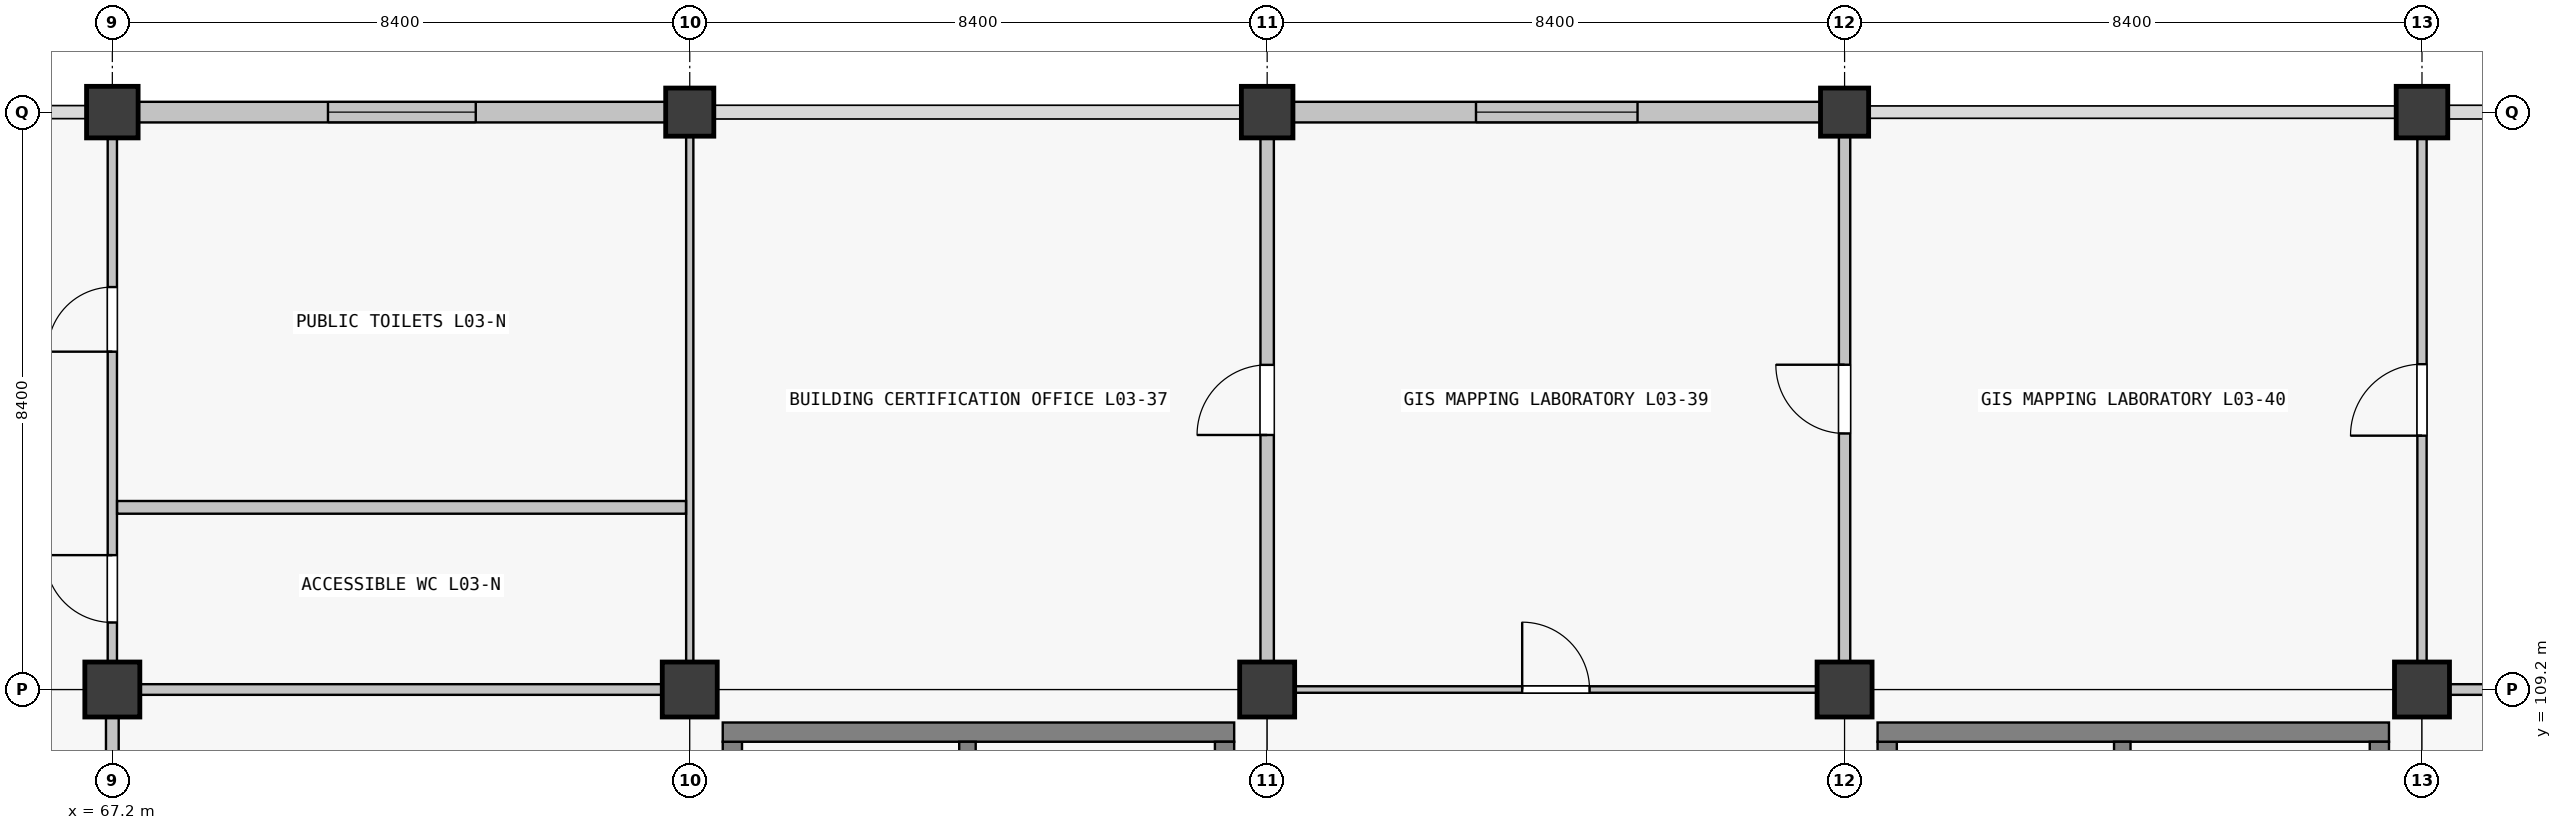
"""IFC4 building model, lengths in metres.
Left out: names, types, materials, properties, quantities, classifications, styles, units other than length and angle.
Written with IfcOpenShell. Run it as: python <this file> out.ifc"""

import sys

from ifc_helpers import new_model, si_unit, direction, frame, frame_2d, origin, origin_2d, place, context, subcontext, project, spatial, rectangle, extrude, element, fill, save


model = new_model("IFC4")
c1 = context("Model", 3, precision=1e-05, world=origin(), true_north=direction((0.0, 1.0)))
c2 = subcontext(c1, "Body", "Model", "MODEL_VIEW")
j1 = project(units=[si_unit("LENGTHUNIT", "METRE"), si_unit("PLANEANGLEUNIT", "RADIAN")], contexts=[c1])
p1 = place(None, origin())
s1 = spatial("IfcSite", under=j1, at=p1, CompositionType="ELEMENT")
p2 = place(p1, origin())
s2 = spatial("IfcBuilding", under=s1, at=p2, CompositionType="ELEMENT")
p3 = place(p2, frame((0.0, 0.0, 14.76)))
s3 = spatial("IfcBuildingStorey", under=s2, at=p3, CompositionType="ELEMENT", Elevation=14.76)
p4 = place(p3, frame((67.2, 109.2, 0.0), z_axis=(0.0, 0.0, 1.0), x_axis=(1.0, 0.0, 0.0)))
e1 = element("IfcColumn", 1, at=p4, inside=s3, PredefinedType="COLUMN", context=c2, shape_type="SweptSolid", body=[
    extrude(rectangle(XDim=0.8, YDim=0.8, at=origin_2d()), origin(), (0.0, 0.0, 1.0), 4.32),
])
p5 = place(p3, frame((67.2, 117.6, 0.0), z_axis=(0.0, 0.0, 1.0), x_axis=(1.0, 0.0, 0.0)))
e2 = element("IfcColumn", 2, at=p5, inside=s3, PredefinedType="COLUMN", context=c2, shape_type="SweptSolid", body=[
    extrude(rectangle(XDim=0.75, YDim=0.75, at=origin_2d()), origin(), (0.0, 0.0, 1.0), 4.32),
])
p6 = place(p3, frame((75.6, 109.2, 0.0), z_axis=(0.0, 0.0, 1.0), x_axis=(1.0, 0.0, 0.0)))
e3 = element("IfcColumn", 3, at=p6, inside=s3, PredefinedType="COLUMN", context=c2, shape_type="SweptSolid", body=[
    extrude(rectangle(XDim=0.8, YDim=0.8, at=origin_2d()), origin(), (0.0, 0.0, 1.0), 4.32),
])
p7 = place(p3, frame((75.6, 117.6, 0.0), z_axis=(0.0, 0.0, 1.0), x_axis=(1.0, 0.0, 0.0)))
e4 = element("IfcColumn", 4, at=p7, inside=s3, PredefinedType="COLUMN", context=c2, shape_type="SweptSolid", body=[
    extrude(rectangle(XDim=0.7, YDim=0.7, at=origin_2d()), origin(), (0.0, 0.0, 1.0), 4.32),
])
p8 = place(p3, frame((84.0, 109.2, 0.0), z_axis=(0.0, 0.0, 1.0), x_axis=(1.0, 0.0, 0.0)))
e5 = element("IfcColumn", 5, at=p8, inside=s3, PredefinedType="COLUMN", context=c2, shape_type="SweptSolid", body=[
    extrude(rectangle(XDim=0.8, YDim=0.8, at=origin_2d()), origin(), (0.0, 0.0, 1.0), 4.32),
])
p9 = place(p3, frame((84.0, 117.6, 0.0), z_axis=(0.0, 0.0, 1.0), x_axis=(1.0, 0.0, 0.0)))
e6 = element("IfcColumn", 6, at=p9, inside=s3, PredefinedType="COLUMN", context=c2, shape_type="SweptSolid", body=[
    extrude(rectangle(XDim=0.75, YDim=0.75, at=origin_2d()), origin(), (0.0, 0.0, 1.0), 4.32),
])
p10 = place(p3, frame((92.4, 109.2, 0.0), z_axis=(0.0, 0.0, 1.0), x_axis=(1.0, 0.0, 0.0)))
e7 = element("IfcColumn", 7, at=p10, inside=s3, PredefinedType="COLUMN", context=c2, shape_type="SweptSolid", body=[
    extrude(rectangle(XDim=0.8, YDim=0.8, at=origin_2d()), origin(), (0.0, 0.0, 1.0), 4.32),
])
p11 = place(p3, frame((92.4, 117.6, 0.0), z_axis=(0.0, 0.0, 1.0), x_axis=(1.0, 0.0, 0.0)))
e8 = element("IfcColumn", 8, at=p11, inside=s3, PredefinedType="COLUMN", context=c2, shape_type="SweptSolid", body=[
    extrude(rectangle(XDim=0.7, YDim=0.7, at=origin_2d()), origin(), (0.0, 0.0, 1.0), 4.32),
])
p12 = place(p3, frame((100.8, 109.2, 0.0), z_axis=(0.0, 0.0, 1.0), x_axis=(1.0, 0.0, 0.0)))
e9 = element("IfcColumn", 9, at=p12, inside=s3, PredefinedType="COLUMN", context=c2, shape_type="SweptSolid", body=[
    extrude(rectangle(XDim=0.8, YDim=0.8, at=origin_2d()), origin(), (0.0, 0.0, 1.0), 4.32),
])
p13 = place(p3, frame((100.8, 117.6, 0.0), z_axis=(0.0, 0.0, 1.0), x_axis=(1.0, 0.0, 0.0)))
e10 = element("IfcColumn", 10, at=p13, inside=s3, PredefinedType="COLUMN", context=c2, shape_type="SweptSolid", body=[
    extrude(rectangle(XDim=0.75, YDim=0.75, at=origin_2d()), origin(), (0.0, 0.0, 1.0), 4.32),
])
p14 = place(p3, frame((67.576, 117.6, 0.0), z_axis=(0.0, 0.0, 1.0), x_axis=(1.0, 0.0, 0.0)))
e11 = element("IfcWall", 11, at=p14, inside=s3, PredefinedType="SOLIDWALL", context=c2, shape_type="SweptSolid", body=[
    extrude(rectangle(XDim=7.673, YDim=0.3, at=frame_2d((3.836, 0.0))), origin(), (0.0, 0.0, 1.0), 3.37),
])
p15 = place(p14, frame((2.761, 0.0, 0.9)))
e12 = element("IfcOpeningElement", 12, at=p15, cuts=e11, PredefinedType="OPENING", context=c2, shape_type="SweptSolid", body=[
    extrude(rectangle(XDim=2.15, YDim=1.95, at=frame_2d((1.075, 0.975))), frame((0.0, 0.15, 0.0), z_axis=(0.0, -1.0, 0.0), x_axis=(1.0, 0.0, 0.0)), (0.0, 0.0, 1.0), 0.3),
])
p16 = place(p3, frame((84.376, 117.6, 0.0), z_axis=(0.0, 0.0, 1.0), x_axis=(1.0, 0.0, 0.0)))
e13 = element("IfcWall", 13, at=p16, inside=s3, PredefinedType="SOLIDWALL", context=c2, shape_type="SweptSolid", body=[
    extrude(rectangle(XDim=7.673, YDim=0.3, at=frame_2d((3.836, 0.0))), origin(), (0.0, 0.0, 1.0), 3.37),
])
p17 = place(p16, frame((2.662, 0.0, 0.9)))
e14 = element("IfcOpeningElement", 14, at=p17, cuts=e13, PredefinedType="OPENING", context=c2, shape_type="SweptSolid", body=[
    extrude(rectangle(XDim=2.35, YDim=1.6, at=frame_2d((1.175, 0.8))), frame((0.0, 0.15, 0.0), z_axis=(0.0, -1.0, 0.0), x_axis=(1.0, 0.0, 0.0)), (0.0, 0.0, 1.0), 0.3),
])
p18 = place(p3, frame((76.22, 101.56, 0.0), z_axis=(0.0, 0.0, 1.0), x_axis=(0.0, 1.0, 0.0)))
e15 = element("IfcWall", 15, at=p18, inside=s3, PredefinedType="SHEAR", context=c2, shape_type="SweptSolid", body=[
    extrude(rectangle(XDim=6.88, YDim=0.28, at=frame_2d((3.44, 0.0))), origin(), (0.0, 0.0, 1.0), 4.32),
])
p19 = place(p3, frame((76.08, 108.58, 0.0), z_axis=(0.0, 0.0, 1.0), x_axis=(1.0, 0.0, 0.0)))
e16 = element("IfcWall", 16, at=p19, inside=s3, PredefinedType="SHEAR", context=c2, shape_type="SweptSolid", body=[
    extrude(rectangle(XDim=7.44, YDim=0.28, at=frame_2d((3.72, 0.0))), origin(), (0.0, 0.0, 1.0), 4.32),
])
p20 = place(p3, frame((83.38, 108.44, 0.0), z_axis=(0.0, 0.0, 1.0), x_axis=(0.0, -1.0, 0.0)))
e17 = element("IfcWall", 17, at=p20, inside=s3, PredefinedType="SHEAR", context=c2, shape_type="SweptSolid", body=[
    extrude(rectangle(XDim=6.88, YDim=0.28, at=frame_2d((3.44, 0.0))), origin(), (0.0, 0.0, 1.0), 4.32),
])
p21 = place(p20, frame((3.99, 0.0, 0.0)))
e18 = element("IfcOpeningElement", 18, at=p21, cuts=e17, PredefinedType="OPENING", context=c2, shape_type="SweptSolid", body=[
    extrude(rectangle(XDim=1.5, YDim=2.15, at=frame_2d((0.75, 1.075))), frame((0.0, 0.14, 0.0), z_axis=(0.0, -1.0, 0.0), x_axis=(1.0, 0.0, 0.0)), (0.0, 0.0, 1.0), 0.28),
])
p22 = place(p3, frame((79.64, 101.56, 0.0), z_axis=(0.0, 0.0, 1.0), x_axis=(0.0, 1.0, 0.0)))
e19 = element("IfcWall", 19, at=p22, inside=s3, PredefinedType="SHEAR", context=c2, shape_type="SweptSolid", body=[
    extrude(rectangle(XDim=6.88, YDim=0.24, at=frame_2d((3.44, 0.0))), origin(), (0.0, 0.0, 1.0), 4.32),
])
p23 = place(p22, frame((0.12, 0.0, 0.0)))
e20 = element("IfcOpeningElement", 20, at=p23, cuts=e19, PredefinedType="OPENING", context=c2, shape_type="SweptSolid", body=[
    extrude(rectangle(XDim=1.0, YDim=2.15, at=frame_2d((0.5, 1.075))), frame((0.0, 0.12, 0.0), z_axis=(0.0, -1.0, 0.0), x_axis=(1.0, 0.0, 0.0)), (0.0, 0.0, 1.0), 0.24),
])
p24 = place(p3, frame((93.02, 101.56, 0.0), z_axis=(0.0, 0.0, 1.0), x_axis=(0.0, 1.0, 0.0)))
e21 = element("IfcWall", 21, at=p24, inside=s3, PredefinedType="SHEAR", context=c2, shape_type="SweptSolid", body=[
    extrude(rectangle(XDim=6.88, YDim=0.28, at=frame_2d((3.44, 0.0))), origin(), (0.0, 0.0, 1.0), 4.32),
])
p25 = place(p3, frame((92.88, 108.58, 0.0), z_axis=(0.0, 0.0, 1.0), x_axis=(1.0, 0.0, 0.0)))
e22 = element("IfcWall", 22, at=p25, inside=s3, PredefinedType="SHEAR", context=c2, shape_type="SweptSolid", body=[
    extrude(rectangle(XDim=7.44, YDim=0.28, at=frame_2d((3.72, 0.0))), origin(), (0.0, 0.0, 1.0), 4.32),
])
p26 = place(p3, frame((100.18, 108.44, 0.0), z_axis=(0.0, 0.0, 1.0), x_axis=(0.0, -1.0, 0.0)))
e23 = element("IfcWall", 23, at=p26, inside=s3, PredefinedType="SHEAR", context=c2, shape_type="SweptSolid", body=[
    extrude(rectangle(XDim=6.88, YDim=0.28, at=frame_2d((3.44, 0.0))), origin(), (0.0, 0.0, 1.0), 4.32),
])
p27 = place(p26, frame((3.99, 0.0, 0.0)))
e24 = element("IfcOpeningElement", 24, at=p27, cuts=e23, PredefinedType="OPENING", context=c2, shape_type="SweptSolid", body=[
    extrude(rectangle(XDim=1.5, YDim=2.15, at=frame_2d((0.75, 1.075))), frame((0.0, 0.14, 0.0), z_axis=(0.0, -1.0, 0.0), x_axis=(1.0, 0.0, 0.0)), (0.0, 0.0, 1.0), 0.28),
])
p28 = place(p3, frame((96.44, 101.56, 0.0), z_axis=(0.0, 0.0, 1.0), x_axis=(0.0, 1.0, 0.0)))
e25 = element("IfcWall", 25, at=p28, inside=s3, PredefinedType="SHEAR", context=c2, shape_type="SweptSolid", body=[
    extrude(rectangle(XDim=6.88, YDim=0.24, at=frame_2d((3.44, 0.0))), origin(), (0.0, 0.0, 1.0), 4.32),
])
p29 = place(p28, frame((0.12, 0.0, 0.0)))
e26 = element("IfcOpeningElement", 26, at=p29, cuts=e25, PredefinedType="OPENING", context=c2, shape_type="SweptSolid", body=[
    extrude(rectangle(XDim=1.0, YDim=2.15, at=frame_2d((0.5, 1.075))), frame((0.0, 0.12, 0.0), z_axis=(0.0, -1.0, 0.0), x_axis=(1.0, 0.0, 0.0)), (0.0, 0.0, 1.0), 0.24),
])
p30 = place(p3, frame((67.602, 109.2, 0.0), z_axis=(0.0, 0.0, 1.0), x_axis=(1.0, 0.0, 0.0)))
e27 = element("IfcWall", 27, at=p30, inside=s3, PredefinedType="PARTITIONING", context=c2, shape_type="SweptSolid", body=[
    extrude(rectangle(XDim=7.596, YDim=0.155, at=frame_2d((3.798, 0.0))), origin(), (0.0, 0.0, 1.0), 3.19),
])
p31 = place(p3, frame((84.402, 109.2, 0.0), z_axis=(0.0, 0.0, 1.0), x_axis=(1.0, 0.0, 0.0)))
e28 = element("IfcWall", 28, at=p31, inside=s3, PredefinedType="PARTITIONING", context=c2, shape_type="SweptSolid", body=[
    extrude(rectangle(XDim=7.596, YDim=0.095, at=frame_2d((3.798, 0.0))), origin(), (0.0, 0.0, 1.0), 3.19),
])
p32 = place(p31, frame((3.308, 0.0, 0.0)))
e29 = element("IfcOpeningElement", 29, at=p32, cuts=e28, PredefinedType="OPENING", context=c2, shape_type="SweptSolid", body=[
    extrude(rectangle(XDim=0.98, YDim=2.18, at=frame_2d((0.49, 1.09))), frame((0.0, 0.047, 0.0), z_axis=(0.0, -1.0, 0.0), x_axis=(1.0, 0.0, 0.0)), (0.0, 0.0, 1.0), 0.095),
])
p33 = place(p3, frame((101.202, 109.2, 0.0), z_axis=(0.0, 0.0, 1.0), x_axis=(1.0, 0.0, 0.0)))
e30 = element("IfcWall", 30, at=p33, inside=s3, PredefinedType="PARTITIONING", context=c2, shape_type="SweptSolid", body=[
    extrude(rectangle(XDim=7.596, YDim=0.155, at=frame_2d((3.798, 0.0))), origin(), (0.0, 0.0, 1.0), 3.19),
])
p34 = place(p33, frame((3.273, 0.0, 0.0)))
e31 = element("IfcOpeningElement", 31, at=p34, cuts=e30, PredefinedType="OPENING", context=c2, shape_type="SweptSolid", body=[
    extrude(rectangle(XDim=1.05, YDim=2.12, at=frame_2d((0.525, 1.06))), frame((0.0, 0.078, 0.0), z_axis=(0.0, -1.0, 0.0), x_axis=(1.0, 0.0, 0.0)), (0.0, 0.0, 1.0), 0.155),
])
p35 = place(p3, frame((67.2, 101.202, 0.0), z_axis=(0.0, 0.0, 1.0), x_axis=(0.0, 1.0, 0.0)))
e32 = element("IfcWall", 32, at=p35, inside=s3, PredefinedType="PARTITIONING", context=c2, shape_type="SweptSolid", body=[
    extrude(rectangle(XDim=7.596, YDim=0.185, at=frame_2d((3.798, 0.0))), origin(), (0.0, 0.0, 1.0), 3.19),
])
p36 = place(p35, frame((3.318, 0.0, 0.0)))
e33 = element("IfcOpeningElement", 33, at=p36, cuts=e32, PredefinedType="OPENING", context=c2, shape_type="SweptSolid", body=[
    extrude(rectangle(XDim=0.96, YDim=2.18, at=frame_2d((0.48, 1.09))), frame((0.0, 0.093, 0.0), z_axis=(0.0, -1.0, 0.0), x_axis=(1.0, 0.0, 0.0)), (0.0, 0.0, 1.0), 0.185),
])
p37 = place(p3, frame((67.2, 109.602, 0.0), z_axis=(0.0, 0.0, 1.0), x_axis=(0.0, 1.0, 0.0)))
e34 = element("IfcWall", 34, at=p37, inside=s3, PredefinedType="PARTITIONING", context=c2, shape_type="SweptSolid", body=[
    extrude(rectangle(XDim=7.621, YDim=0.135, at=frame_2d((3.811, 0.0))), origin(), (0.0, 0.0, 1.0), 3.19),
])
p38 = place(p37, frame((0.573, 0.0, 0.0)))
e35 = element("IfcOpeningElement", 35, at=p38, cuts=e34, PredefinedType="OPENING", context=c2, shape_type="SweptSolid", body=[
    extrude(rectangle(XDim=0.98, YDim=2.08, at=frame_2d((0.49, 1.04))), frame((0.0, 0.067, 0.0), z_axis=(0.0, -1.0, 0.0), x_axis=(1.0, 0.0, 0.0)), (0.0, 0.0, 1.0), 0.135),
])
p39 = place(p37, frame((4.513, 0.0, 0.0)))
e36 = element("IfcOpeningElement", 36, at=p39, cuts=e34, PredefinedType="OPENING", context=c2, shape_type="SweptSolid", body=[
    extrude(rectangle(XDim=0.94, YDim=2.08, at=frame_2d((0.47, 1.04))), frame((0.0, 0.067, 0.0), z_axis=(0.0, -1.0, 0.0), x_axis=(1.0, 0.0, 0.0)), (0.0, 0.0, 1.0), 0.135),
])
p40 = place(p3, frame((75.6, 109.602, 0.0), z_axis=(0.0, 0.0, 1.0), x_axis=(0.0, 1.0, 0.0)))
e37 = element("IfcWall", 37, at=p40, inside=s3, PredefinedType="PARTITIONING", context=c2, shape_type="SweptSolid", body=[
    extrude(rectangle(XDim=7.646, YDim=0.105, at=frame_2d((3.823, 0.0))), origin(), (0.0, 0.0, 1.0), 3.19),
])
p41 = place(p3, frame((84.0, 109.602, 0.0), z_axis=(0.0, 0.0, 1.0), x_axis=(0.0, 1.0, 0.0)))
e38 = element("IfcWall", 38, at=p41, inside=s3, PredefinedType="PARTITIONING", context=c2, shape_type="SweptSolid", body=[
    extrude(rectangle(XDim=7.621, YDim=0.195, at=frame_2d((3.811, 0.0))), origin(), (0.0, 0.0, 1.0), 3.19),
])
p42 = place(p41, frame((3.301, 0.0, 0.0)))
e39 = element("IfcOpeningElement", 39, at=p42, cuts=e38, PredefinedType="OPENING", context=c2, shape_type="SweptSolid", body=[
    extrude(rectangle(XDim=1.02, YDim=2.2, at=frame_2d((0.51, 1.1))), frame((0.0, 0.098, 0.0), z_axis=(0.0, -1.0, 0.0), x_axis=(1.0, 0.0, 0.0)), (0.0, 0.0, 1.0), 0.195),
])
p43 = place(p3, frame((92.4, 109.602, 0.0), z_axis=(0.0, 0.0, 1.0), x_axis=(0.0, 1.0, 0.0)))
e40 = element("IfcWall", 40, at=p43, inside=s3, PredefinedType="PARTITIONING", context=c2, shape_type="SweptSolid", body=[
    extrude(rectangle(XDim=7.646, YDim=0.165, at=frame_2d((3.823, 0.0))), origin(), (0.0, 0.0, 1.0), 3.19),
])
p44 = place(p43, frame((3.323, 0.0, 0.0)))
e41 = element("IfcOpeningElement", 41, at=p44, cuts=e40, PredefinedType="OPENING", context=c2, shape_type="SweptSolid", body=[
    extrude(rectangle(XDim=1.0, YDim=2.2, at=frame_2d((0.5, 1.1))), frame((0.0, 0.083, 0.0), z_axis=(0.0, -1.0, 0.0), x_axis=(1.0, 0.0, 0.0)), (0.0, 0.0, 1.0), 0.165),
])
p45 = place(p3, frame((100.8, 109.602, 0.0), z_axis=(0.0, 0.0, 1.0), x_axis=(0.0, 1.0, 0.0)))
e42 = element("IfcWall", 42, at=p45, inside=s3, PredefinedType="PARTITIONING", context=c2, shape_type="SweptSolid", body=[
    extrude(rectangle(XDim=7.621, YDim=0.135, at=frame_2d((3.811, 0.0))), origin(), (0.0, 0.0, 1.0), 3.19),
])
p46 = place(p45, frame((3.291, 0.0, 0.0)))
e43 = element("IfcOpeningElement", 43, at=p46, cuts=e42, PredefinedType="OPENING", context=c2, shape_type="SweptSolid", body=[
    extrude(rectangle(XDim=1.04, YDim=2.2, at=frame_2d((0.52, 1.1))), frame((0.0, 0.067, 0.0), z_axis=(0.0, -1.0, 0.0), x_axis=(1.0, 0.0, 0.0)), (0.0, 0.0, 1.0), 0.135),
])
p47 = place(p3, frame((67.27, 111.85, 0.0), z_axis=(0.0, 0.0, 1.0), x_axis=(1.0, 0.0, 0.0)))
e44 = element("IfcWall", 44, at=p47, inside=s3, PredefinedType="PARTITIONING", context=c2, shape_type="SweptSolid", body=[
    extrude(rectangle(XDim=8.276, YDim=0.185, at=frame_2d((4.138, 0.0))), origin(), (0.0, 0.0, 1.0), 3.19),
])
p48 = place(p15, origin())
e45 = element("IfcWindow", 45, at=p48, inside=s3, PartitioningType="SINGLE_PANEL", PredefinedType="WINDOW", context=c2, shape_type="SweptSolid", body=[
    extrude(rectangle(XDim=2.15, YDim=1.95, at=frame_2d((1.075, 0.975))), frame((0.0, 0.03, 0.0), z_axis=(0.0, -1.0, 0.0), x_axis=(1.0, 0.0, 0.0)), (0.0, 0.0, 1.0), 0.06),
])
fill(e12, e45)
p49 = place(p17, origin())
e46 = element("IfcWindow", 46, at=p49, inside=s3, PartitioningType="SINGLE_PANEL", PredefinedType="WINDOW", context=c2, shape_type="SweptSolid", body=[
    extrude(rectangle(XDim=2.35, YDim=1.6, at=frame_2d((1.175, 0.8))), frame((0.0, 0.03, 0.0), z_axis=(0.0, -1.0, 0.0), x_axis=(1.0, 0.0, 0.0)), (0.0, 0.0, 1.0), 0.06),
])
fill(e14, e46)
p50 = place(p38, origin())
e47 = element("IfcDoor", 47, at=p50, inside=s3, OperationType="SINGLE_SWING_RIGHT", PredefinedType="DOOR", context=c2, shape_type="SweptSolid", body=[
    extrude(rectangle(XDim=0.98, YDim=2.08, at=frame_2d((0.49, 1.04))), frame((0.0, 0.025, 0.0), z_axis=(0.0, -1.0, 0.0), x_axis=(1.0, 0.0, 0.0)), (0.0, 0.0, 1.0), 0.05),
])
fill(e35, e47)
p51 = place(p39, origin())
e48 = element("IfcDoor", 48, at=p51, inside=s3, OperationType="SINGLE_SWING_LEFT", PredefinedType="DOOR", context=c2, shape_type="SweptSolid", body=[
    extrude(rectangle(XDim=0.94, YDim=2.08, at=frame_2d((0.47, 1.04))), frame((0.0, 0.025, 0.0), z_axis=(0.0, -1.0, 0.0), x_axis=(1.0, 0.0, 0.0)), (0.0, 0.0, 1.0), 0.05),
])
fill(e36, e48)
p52 = place(p32, origin())
e49 = element("IfcDoor", 49, at=p52, inside=s3, OperationType="SINGLE_SWING_LEFT", PredefinedType="DOOR", context=c2, shape_type="SweptSolid", body=[
    extrude(rectangle(XDim=0.98, YDim=2.18, at=frame_2d((0.49, 1.09))), frame((0.0, 0.025, 0.0), z_axis=(0.0, -1.0, 0.0), x_axis=(1.0, 0.0, 0.0)), (0.0, 0.0, 1.0), 0.05),
])
fill(e29, e49)
p53 = place(p42, origin())
e50 = element("IfcDoor", 50, at=p53, inside=s3, OperationType="SINGLE_SWING_LEFT", PredefinedType="DOOR", context=c2, shape_type="SweptSolid", body=[
    extrude(rectangle(XDim=1.02, YDim=2.2, at=frame_2d((0.51, 1.1))), frame((0.0, 0.025, 0.0), z_axis=(0.0, -1.0, 0.0), x_axis=(1.0, 0.0, 0.0)), (0.0, 0.0, 1.0), 0.05),
])
fill(e39, e50)
p54 = place(p44, origin())
e51 = element("IfcDoor", 51, at=p54, inside=s3, OperationType="SINGLE_SWING_RIGHT", PredefinedType="DOOR", context=c2, shape_type="SweptSolid", body=[
    extrude(rectangle(XDim=1.0, YDim=2.2, at=frame_2d((0.5, 1.1))), frame((0.0, 0.025, 0.0), z_axis=(0.0, -1.0, 0.0), x_axis=(1.0, 0.0, 0.0)), (0.0, 0.0, 1.0), 0.05),
])
fill(e41, e51)
p55 = place(p46, origin())
e52 = element("IfcDoor", 52, at=p55, inside=s3, OperationType="SINGLE_SWING_LEFT", PredefinedType="DOOR", context=c2, shape_type="SweptSolid", body=[
    extrude(rectangle(XDim=1.04, YDim=2.2, at=frame_2d((0.52, 1.1))), frame((0.0, 0.025, 0.0), z_axis=(0.0, -1.0, 0.0), x_axis=(1.0, 0.0, 0.0)), (0.0, 0.0, 1.0), 0.05),
])
fill(e43, e52)
save(model, sys.argv[1])
